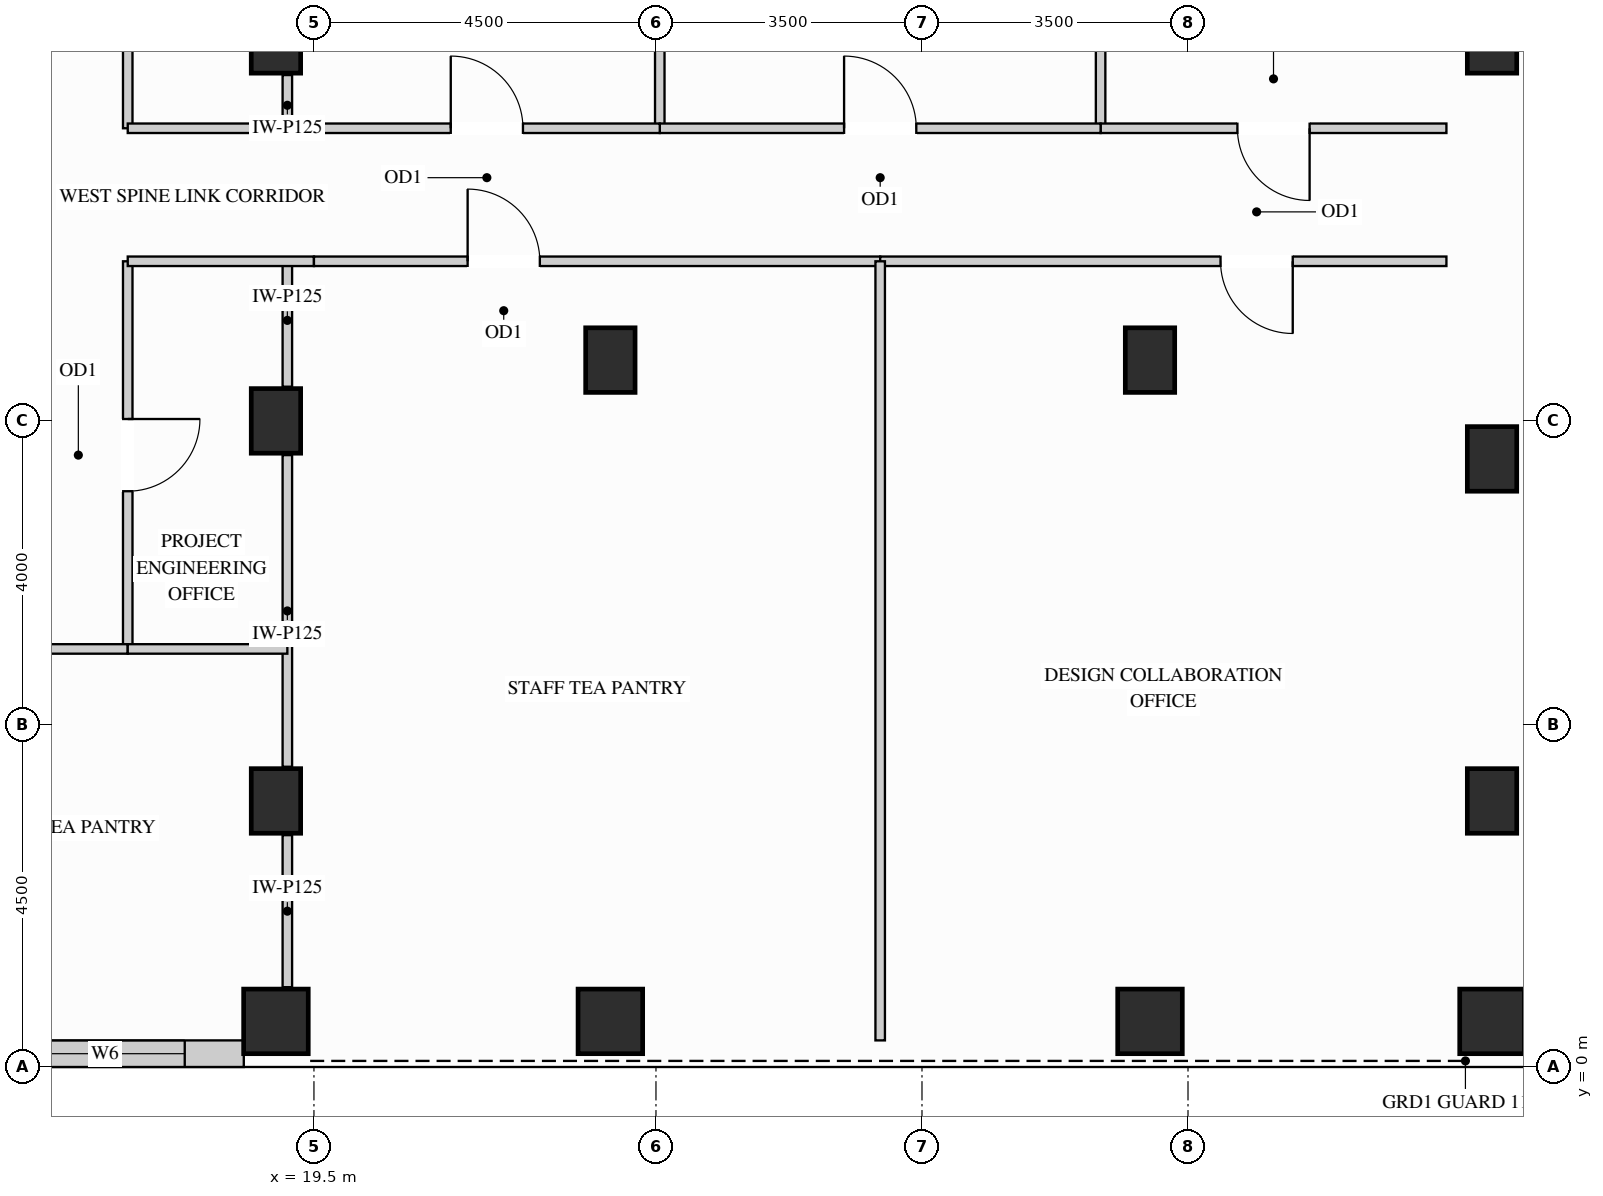
"""IFC4 building model, lengths in metres.
Left out: names, types, materials, properties, quantities, classifications, styles, units other than length and angle.
Written with IfcOpenShell. Run it as: python <this file> out.ifc"""

import sys

from ifc_helpers import new_model, si_unit, direction, frame, frame_2d, origin, origin_2d, place, context, subcontext, project, spatial, rectangle, extrude, source, transform, mapped, element, fill, save


model = new_model("IFC4")
c1 = context("Model", 3, precision=1e-05, world=origin(), true_north=direction((0.0, 1.0)))
c2 = subcontext(c1, "Body", "Model", "MODEL_VIEW")
j1 = project(units=[si_unit("LENGTHUNIT", "METRE"), si_unit("PLANEANGLEUNIT", "RADIAN")], contexts=[c1])
p1 = place(None, origin())
s1 = spatial("IfcSite", under=j1, at=p1, CompositionType="ELEMENT")
p2 = place(p1, origin())
s2 = spatial("IfcBuilding", under=s1, at=p2, CompositionType="ELEMENT")
p3 = place(p2, frame((0.0, 0.0, 259.2)))
s3 = spatial("IfcBuildingStorey", under=s2, at=p3, CompositionType="ELEMENT", Elevation=259.2)
m1 = source(origin(), c2, "Body", "SweptSolid", [
    extrude(rectangle(XDim=0.65, YDim=0.85, at=origin_2d()), origin(), (0.0, 0.0, 1.0), 3.4),
])
for number, where, z_axis, x_axis in (
    (1, (19.0, 13.5, 0.0), (0.0, 0.0, 1.0), (1.0, 0.0, 0.0)),
    (2, (19.0, 3.5, 0.0), (0.0, 0.0, 1.0), (1.0, 0.0, 0.0)),
    (3, (19.0, 8.5, 0.0), (0.0, 0.0, 1.0), (1.0, 0.0, 0.0)),
    (4, (35.0, 13.5, 0.0), (0.0, 0.0, 1.0), (1.0, 0.0, 0.0)),
    (5, (35.0, 3.5, 0.0), (0.0, 0.0, 1.0), (1.0, 0.0, 0.0)),
    (6, (35.0, 8.0, 0.0), (0.0, 0.0, 1.0), (1.0, 0.0, 0.0)),
    (7, (23.4, 9.3, 0.0), (0.0, 0.0, 1.0), (1.0, 0.0, 0.0)),
    (8, (30.5, 9.3, 0.0), (0.0, 0.0, 1.0), (1.0, 0.0, 0.0)),
):
    element("IfcColumn", number, at=place(p3, frame(where, z_axis=z_axis, x_axis=x_axis)), inside=s3, PredefinedType="COLUMN", context=c2, shape_type="MappedRepresentation", body=[
        mapped(m1, transform((0.0, 0.0, 0.0), x_axis=(1.0, 0.0, 0.0), y_axis=(0.0, 1.0, 0.0), z_axis=(0.0, 0.0, 1.0))),
    ])
m2 = source(origin(), c2, "Body", "SweptSolid", [
    extrude(rectangle(XDim=0.85, YDim=0.85, at=origin_2d()), origin(), (0.0, 0.0, 1.0), 3.4),
])
for number, where, z_axis, x_axis in (
    (9, (19.0, 0.6, 0.0), (0.0, 0.0, 1.0), (1.0, 0.0, 0.0)),
    (10, (23.4, 0.6, 0.0), (0.0, 0.0, 1.0), (1.0, 0.0, 0.0)),
    (11, (30.5, 0.6, 0.0), (0.0, 0.0, 1.0), (1.0, 0.0, 0.0)),
    (12, (35.0, 0.6, 0.0), (0.0, 0.0, 1.0), (1.0, 0.0, 0.0)),
):
    element("IfcColumn", number, at=place(p3, frame(where, z_axis=z_axis, x_axis=x_axis)), inside=s3, PredefinedType="COLUMN", context=c2, shape_type="MappedRepresentation", body=[
        mapped(m2, transform((0.0, 0.0, 0.0), x_axis=(1.0, 0.0, 0.0), y_axis=(0.0, 1.0, 0.0), z_axis=(0.0, 0.0, 1.0))),
    ])
p4 = place(p3, frame((14.923, 0.175, 0.0), z_axis=(0.0, 0.0, 1.0), x_axis=(1.0, 0.0, 0.0)))
e13 = element("IfcWall", 13, at=p4, inside=s3, PredefinedType="SOLIDWALL", context=c2, shape_type="SweptSolid", body=[
    extrude(rectangle(XDim=3.654, YDim=0.35, at=frame_2d((1.827, 0.0))), origin(), (0.0, 0.0, 1.0), 3.385),
])
p5 = place(p4, frame((0.777, 0.0, 0.78)))
e14 = element("IfcOpeningElement", 14, at=p5, cuts=e13, PredefinedType="OPENING", context=c2, shape_type="SweptSolid", body=[
    extrude(rectangle(XDim=2.1, YDim=2.25, at=frame_2d((1.05, 1.125))), frame((0.0, 0.185, 0.0), z_axis=(0.0, -1.0, 0.0), x_axis=(1.0, 0.0, 0.0)), (0.0, 0.0, 1.0), 0.37),
])
m3 = source(origin(), c2, "Body", "SweptSolid", [
    extrude(rectangle(XDim=0.7, YDim=0.125, at=frame_2d((0.35, 0.0))), origin(), (0.0, 0.0, 1.0), 2.773),
])
p6 = place(p3, frame((19.15, 12.35, 0.0), z_axis=(0.0, 0.0, 1.0), x_axis=(0.0, 1.0, 0.0)))
e15 = element("IfcWall", 15, at=p6, inside=s3, PredefinedType="PARTITIONING", context=c2, shape_type="MappedRepresentation", body=[
    mapped(m3, transform((0.0, 0.0, 0.0), x_axis=(1.0, 0.0, 0.0), y_axis=(0.0, 1.0, 0.0), z_axis=(0.0, 0.0, 1.0))),
])
m4 = source(origin(), c2, "Body", "SweptSolid", [
    extrude(rectangle(XDim=2.0, YDim=0.125, at=frame_2d((1.0, 0.0))), origin(), (0.0, 0.0, 1.0), 2.773),
])
p7 = place(p3, frame((19.15, 1.05, 0.0), z_axis=(0.0, 0.0, 1.0), x_axis=(0.0, 1.0, 0.0)))
e16 = element("IfcWall", 16, at=p7, inside=s3, PredefinedType="PARTITIONING", context=c2, shape_type="MappedRepresentation", body=[
    mapped(m4, transform((0.0, 0.0, 0.0), x_axis=(1.0, 0.0, 0.0), y_axis=(0.0, 1.0, 0.0), z_axis=(0.0, 0.0, 1.0))),
])
m5 = source(origin(), c2, "Body", "SweptSolid", [
    extrude(rectangle(XDim=4.1, YDim=0.125, at=frame_2d((2.05, 0.0))), origin(), (0.0, 0.0, 1.0), 2.773),
])
p8 = place(p3, frame((19.15, 3.95, 0.0), z_axis=(0.0, 0.0, 1.0), x_axis=(0.0, 1.0, 0.0)))
e17 = element("IfcWall", 17, at=p8, inside=s3, PredefinedType="PARTITIONING", context=c2, shape_type="MappedRepresentation", body=[
    mapped(m5, transform((0.0, 0.0, 0.0), x_axis=(1.0, 0.0, 0.0), y_axis=(0.0, 1.0, 0.0), z_axis=(0.0, 0.0, 1.0))),
])
m6 = source(origin(), c2, "Body", "SweptSolid", [
    extrude(rectangle(XDim=1.65, YDim=0.125, at=frame_2d((0.825, 0.0))), origin(), (0.0, 0.0, 1.0), 2.773),
])
p9 = place(p3, frame((19.15, 8.95, 0.0), z_axis=(0.0, 0.0, 1.0), x_axis=(0.0, 1.0, 0.0)))
e18 = element("IfcWall", 18, at=p9, inside=s3, PredefinedType="PARTITIONING", context=c2, shape_type="MappedRepresentation", body=[
    mapped(m6, transform((0.0, 0.0, 0.0), x_axis=(1.0, 0.0, 0.0), y_axis=(0.0, 1.0, 0.0), z_axis=(0.0, 0.0, 1.0))),
])
p10 = place(p3, frame((17.05, 12.35, 0.0), z_axis=(0.0, 0.0, 1.0), x_axis=(0.0, 1.0, 0.0)))
e19 = element("IfcWall", 19, at=p10, inside=s3, PredefinedType="PARTITIONING", context=c2, shape_type="SweptSolid", body=[
    extrude(rectangle(XDim=5.75, YDim=0.125, at=frame_2d((2.875, 0.0))), origin(), (0.0, 0.0, 1.0), 3.385),
])
p11 = place(p10, frame((2.4, 0.0, 0.0)))
e20 = element("IfcOpeningElement", 20, at=p11, cuts=e19, PredefinedType="OPENING", context=c2, shape_type="SweptSolid", body=[
    extrude(rectangle(XDim=0.95, YDim=2.15, at=frame_2d((0.475, 1.075))), frame((0.0, 0.073, 0.0), z_axis=(0.0, -1.0, 0.0), x_axis=(1.0, 0.0, 0.0)), (0.0, 0.0, 1.0), 0.145),
])
p12 = place(p3, frame((17.05, 5.5, 0.0), z_axis=(0.0, 0.0, 1.0), x_axis=(0.0, 1.0, 0.0)))
e21 = element("IfcWall", 21, at=p12, inside=s3, PredefinedType="PARTITIONING", context=c2, shape_type="SweptSolid", body=[
    extrude(rectangle(XDim=5.1, YDim=0.125, at=frame_2d((2.55, 0.0))), origin(), (0.0, 0.0, 1.0), 3.385),
])
p13 = place(p12, frame((2.075, 0.0, 0.0)))
e22 = element("IfcOpeningElement", 22, at=p13, cuts=e21, PredefinedType="OPENING", context=c2, shape_type="SweptSolid", body=[
    extrude(rectangle(XDim=0.95, YDim=2.15, at=frame_2d((0.475, 1.075))), frame((0.0, 0.073, 0.0), z_axis=(0.0, -1.0, 0.0), x_axis=(1.0, 0.0, 0.0)), (0.0, 0.0, 1.0), 0.145),
])
m7 = source(origin(), c2, "Body", "SweptSolid", [
    extrude(rectangle(XDim=9.798, YDim=0.125, at=frame_2d((4.899, 0.0))), origin(), (0.0, 0.0, 1.0), 3.385),
])
for number, where, z_axis, x_axis in (
    (23, (24.05, 12.35, 0.0), (0.0, 0.0, 1.0), (0.0, 1.0, 0.0)),
    (24, (29.85, 12.35, 0.0), (0.0, 0.0, 1.0), (0.0, 1.0, 0.0)),
):
    element("IfcWall", number, at=place(p3, frame(where, z_axis=z_axis, x_axis=x_axis)), inside=s3, PredefinedType="PARTITIONING", context=c2, shape_type="MappedRepresentation", body=[
        mapped(m7, transform((0.0, 0.0, 0.0), x_axis=(1.0, 0.0, 0.0), y_axis=(0.0, 1.0, 0.0), z_axis=(0.0, 0.0, 1.0))),
    ])
p14 = place(p3, frame((29.85, 12.35, 0.0), z_axis=(0.0, 0.0, 1.0), x_axis=(1.0, 0.0, 0.0)))
e25 = element("IfcWall", 25, at=p14, inside=s3, PredefinedType="PARTITIONING", context=c2, shape_type="SweptSolid", body=[
    extrude(rectangle(XDim=4.55, YDim=0.125, at=frame_2d((2.275, 0.0))), origin(), (0.0, 0.0, 1.0), 3.385),
])
p15 = place(p14, frame((1.8, 0.0, 0.0)))
e26 = element("IfcOpeningElement", 26, at=p15, cuts=e25, PredefinedType="OPENING", context=c2, shape_type="SweptSolid", body=[
    extrude(rectangle(XDim=0.95, YDim=2.15, at=frame_2d((0.475, 1.075))), frame((0.0, 0.073, 0.0), z_axis=(0.0, -1.0, 0.0), x_axis=(1.0, 0.0, 0.0)), (0.0, 0.0, 1.0), 0.145),
])
p16 = place(p3, frame((24.05, 12.35, 0.0), z_axis=(0.0, 0.0, 1.0), x_axis=(1.0, 0.0, 0.0)))
e27 = element("IfcWall", 27, at=p16, inside=s3, PredefinedType="PARTITIONING", context=c2, shape_type="SweptSolid", body=[
    extrude(rectangle(XDim=5.8, YDim=0.125, at=frame_2d((2.9, 0.0))), origin(), (0.0, 0.0, 1.0), 3.385),
])
p17 = place(p16, frame((2.425, 0.0, 0.0)))
e28 = element("IfcOpeningElement", 28, at=p17, cuts=e27, PredefinedType="OPENING", context=c2, shape_type="SweptSolid", body=[
    extrude(rectangle(XDim=0.95, YDim=2.15, at=frame_2d((0.475, 1.075))), frame((0.0, 0.073, 0.0), z_axis=(0.0, -1.0, 0.0), x_axis=(1.0, 0.0, 0.0)), (0.0, 0.0, 1.0), 0.145),
])
m8 = source(origin(), c2, "Body", "SweptSolid", [
    extrude(rectangle(XDim=2.45, YDim=0.125, at=frame_2d((1.225, 0.0))), origin(), (0.0, 0.0, 1.0), 3.385),
])
p18 = place(p3, frame((17.05, 12.35, 0.0), z_axis=(0.0, 0.0, 1.0), x_axis=(1.0, 0.0, 0.0)))
e29 = element("IfcWall", 29, at=p18, inside=s3, PredefinedType="PARTITIONING", context=c2, shape_type="MappedRepresentation", body=[
    mapped(m8, transform((0.0, 0.0, 0.0), x_axis=(1.0, 0.0, 0.0), y_axis=(0.0, 1.0, 0.0), z_axis=(0.0, 0.0, 1.0))),
])
p19 = place(p3, frame((19.5, 12.35, 0.0), z_axis=(0.0, 0.0, 1.0), x_axis=(1.0, 0.0, 0.0)))
e30 = element("IfcWall", 30, at=p19, inside=s3, PredefinedType="PARTITIONING", context=c2, shape_type="SweptSolid", body=[
    extrude(rectangle(XDim=4.55, YDim=0.125, at=frame_2d((2.275, 0.0))), origin(), (0.0, 0.0, 1.0), 3.385),
])
p20 = place(p19, frame((1.8, 0.0, 0.0)))
e31 = element("IfcOpeningElement", 31, at=p20, cuts=e30, PredefinedType="OPENING", context=c2, shape_type="SweptSolid", body=[
    extrude(rectangle(XDim=0.95, YDim=2.15, at=frame_2d((0.475, 1.075))), frame((0.0, 0.073, 0.0), z_axis=(0.0, -1.0, 0.0), x_axis=(1.0, 0.0, 0.0)), (0.0, 0.0, 1.0), 0.145),
])
p21 = place(p3, frame((17.05, 10.6, 0.0), z_axis=(0.0, 0.0, 1.0), x_axis=(1.0, 0.0, 0.0)))
e32 = element("IfcWall", 32, at=p21, inside=s3, PredefinedType="PARTITIONING", context=c2, shape_type="MappedRepresentation", body=[
    mapped(m8, transform((0.0, 0.0, 0.0), x_axis=(1.0, 0.0, 0.0), y_axis=(0.0, 1.0, 0.0), z_axis=(0.0, 0.0, 1.0))),
])
p22 = place(p3, frame((19.5, 10.6, 0.0), z_axis=(0.0, 0.0, 1.0), x_axis=(1.0, 0.0, 0.0)))
e33 = element("IfcWall", 33, at=p22, inside=s3, PredefinedType="PARTITIONING", context=c2, shape_type="SweptSolid", body=[
    extrude(rectangle(XDim=7.45, YDim=0.125, at=frame_2d((3.725, 0.0))), origin(), (0.0, 0.0, 1.0), 3.385),
])
p23 = place(p22, frame((2.022, 0.0, 0.0)))
e34 = element("IfcOpeningElement", 34, at=p23, cuts=e33, PredefinedType="OPENING", context=c2, shape_type="SweptSolid", body=[
    extrude(rectangle(XDim=0.95, YDim=2.15, at=frame_2d((0.475, 1.075))), frame((0.0, 0.073, 0.0), z_axis=(0.0, -1.0, 0.0), x_axis=(1.0, 0.0, 0.0)), (0.0, 0.0, 1.0), 0.145),
])
p24 = place(p3, frame((26.95, 10.6, 0.0), z_axis=(0.0, 0.0, 1.0), x_axis=(1.0, 0.0, 0.0)))
e35 = element("IfcWall", 35, at=p24, inside=s3, PredefinedType="PARTITIONING", context=c2, shape_type="SweptSolid", body=[
    extrude(rectangle(XDim=7.45, YDim=0.125, at=frame_2d((3.725, 0.0))), origin(), (0.0, 0.0, 1.0), 3.385),
])
p25 = place(p24, frame((4.478, 0.0, 0.0)))
e36 = element("IfcOpeningElement", 36, at=p25, cuts=e35, PredefinedType="OPENING", context=c2, shape_type="SweptSolid", body=[
    extrude(rectangle(XDim=0.95, YDim=2.15, at=frame_2d((0.475, 1.075))), frame((0.0, 0.073, 0.0), z_axis=(0.0, -1.0, 0.0), x_axis=(1.0, 0.0, 0.0)), (0.0, 0.0, 1.0), 0.145),
])
m9 = source(origin(), c2, "Body", "SweptSolid", [
    extrude(rectangle(XDim=10.25, YDim=0.125, at=frame_2d((5.125, 0.0))), origin(), (0.0, 0.0, 1.0), 3.385),
])
p26 = place(p3, frame((26.95, 0.35, 0.0), z_axis=(0.0, 0.0, 1.0), x_axis=(0.0, 1.0, 0.0)))
e37 = element("IfcWall", 37, at=p26, inside=s3, PredefinedType="PARTITIONING", context=c2, shape_type="MappedRepresentation", body=[
    mapped(m9, transform((0.0, 0.0, 0.0), x_axis=(1.0, 0.0, 0.0), y_axis=(0.0, 1.0, 0.0), z_axis=(0.0, 0.0, 1.0))),
])
p27 = place(p3, frame((10.875, 5.5, 0.0), z_axis=(0.0, 0.0, 1.0), x_axis=(1.0, 0.0, 0.0)))
e38 = element("IfcWall", 38, at=p27, inside=s3, PredefinedType="PARTITIONING", context=c2, shape_type="SweptSolid", body=[
    extrude(rectangle(XDim=6.175, YDim=0.125, at=frame_2d((3.087, 0.0))), origin(), (0.0, 0.0, 1.0), 3.385),
])
p28 = place(p27, frame((2.613, 0.0, 0.0)))
e39 = element("IfcOpeningElement", 39, at=p28, cuts=e38, PredefinedType="OPENING", context=c2, shape_type="SweptSolid", body=[
    extrude(rectangle(XDim=0.95, YDim=2.15, at=frame_2d((0.475, 1.075))), frame((0.0, 0.073, 0.0), z_axis=(0.0, -1.0, 0.0), x_axis=(1.0, 0.0, 0.0)), (0.0, 0.0, 1.0), 0.145),
])
m10 = source(origin(), c2, "Body", "SweptSolid", [
    extrude(rectangle(XDim=2.1, YDim=0.125, at=frame_2d((1.05, 0.0))), origin(), (0.0, 0.0, 1.0), 3.385),
])
p29 = place(p3, frame((17.05, 5.5, 0.0), z_axis=(0.0, 0.0, 1.0), x_axis=(1.0, 0.0, 0.0)))
e40 = element("IfcWall", 40, at=p29, inside=s3, PredefinedType="PARTITIONING", context=c2, shape_type="MappedRepresentation", body=[
    mapped(m10, transform((0.0, 0.0, 0.0), x_axis=(1.0, 0.0, 0.0), y_axis=(0.0, 1.0, 0.0), z_axis=(0.0, 0.0, 1.0))),
])
m11 = source(origin(), c2, "Body", "SweptSolid", [
    extrude(rectangle(XDim=0.95, YDim=2.15, at=frame_2d((0.475, 1.075))), frame((0.0, 0.025, 0.0), z_axis=(0.0, -1.0, 0.0), x_axis=(1.0, 0.0, 0.0)), (0.0, 0.0, 1.0), 0.05),
])
p30 = place(p13, origin())
e41 = element("IfcDoor", 41, at=p30, inside=s3, OperationType="SINGLE_SWING_RIGHT", PredefinedType="DOOR", context=c2, shape_type="MappedRepresentation", body=[
    mapped(m11, transform((0.0, 0.0, 0.0), x_axis=(1.0, 0.0, 0.0), y_axis=(0.0, 1.0, 0.0), z_axis=(0.0, 0.0, 1.0))),
])
fill(e22, e41)
p31 = place(p17, origin())
e42 = element("IfcDoor", 42, at=p31, inside=s3, OperationType="SINGLE_SWING_LEFT", PredefinedType="DOOR", context=c2, shape_type="MappedRepresentation", body=[
    mapped(m11, transform((0.0, 0.0, 0.0), x_axis=(1.0, 0.0, 0.0), y_axis=(0.0, 1.0, 0.0), z_axis=(0.0, 0.0, 1.0))),
])
fill(e28, e42)
p32 = place(p20, origin())
e43 = element("IfcDoor", 43, at=p32, inside=s3, OperationType="SINGLE_SWING_LEFT", PredefinedType="DOOR", context=c2, shape_type="MappedRepresentation", body=[
    mapped(m11, transform((0.0, 0.0, 0.0), x_axis=(1.0, 0.0, 0.0), y_axis=(0.0, 1.0, 0.0), z_axis=(0.0, 0.0, 1.0))),
])
fill(e31, e43)
p33 = place(p15, origin())
e44 = element("IfcDoor", 44, at=p33, inside=s3, OperationType="SINGLE_SWING_RIGHT", PredefinedType="DOOR", context=c2, shape_type="MappedRepresentation", body=[
    mapped(m11, transform((0.0, 0.0, 0.0), x_axis=(1.0, 0.0, 0.0), y_axis=(0.0, 1.0, 0.0), z_axis=(0.0, 0.0, 1.0))),
])
fill(e26, e44)
p34 = place(p23, origin())
e45 = element("IfcDoor", 45, at=p34, inside=s3, OperationType="SINGLE_SWING_LEFT", PredefinedType="DOOR", context=c2, shape_type="MappedRepresentation", body=[
    mapped(m11, transform((0.0, 0.0, 0.0), x_axis=(1.0, 0.0, 0.0), y_axis=(0.0, 1.0, 0.0), z_axis=(0.0, 0.0, 1.0))),
])
fill(e34, e45)
p35 = place(p25, origin())
e46 = element("IfcDoor", 46, at=p35, inside=s3, OperationType="SINGLE_SWING_RIGHT", PredefinedType="DOOR", context=c2, shape_type="MappedRepresentation", body=[
    mapped(m11, transform((0.0, 0.0, 0.0), x_axis=(1.0, 0.0, 0.0), y_axis=(0.0, 1.0, 0.0), z_axis=(0.0, 0.0, 1.0))),
])
fill(e36, e46)
m12 = source(origin(), c2, "Body", "SweptSolid", [
    extrude(rectangle(XDim=2.1, YDim=2.25, at=frame_2d((1.05, 1.125))), frame((0.0, 0.03, 0.0), z_axis=(0.0, -1.0, 0.0), x_axis=(1.0, 0.0, 0.0)), (0.0, 0.0, 1.0), 0.06),
])
p36 = place(p5, origin())
e47 = element("IfcWindow", 47, at=p36, inside=s3, PartitioningType="SINGLE_PANEL", PredefinedType="WINDOW", context=c2, shape_type="MappedRepresentation", body=[
    mapped(m12, transform((0.0, 0.0, 0.0), x_axis=(1.0, 0.0, 0.0), y_axis=(0.0, 1.0, 0.0), z_axis=(0.0, 0.0, 1.0))),
])
fill(e14, e47)
save(model, sys.argv[1])
